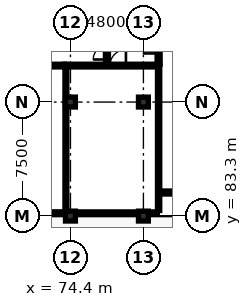
"""IFC4 building model, lengths in metres.
Left out: names, types, materials, properties, quantities, classifications, styles, units other than length and angle.
Written with IfcOpenShell. Run it as: python <this file> out.ifc"""

import sys

from ifc_helpers import new_model, si_unit, direction, frame, frame_2d, origin, origin_2d, place, context, subcontext, project, spatial, rectangle, extrude, element, fill, save


model = new_model("IFC4")
c1 = context("Model", 3, precision=1e-05, world=origin(), true_north=direction((0.0, 1.0)))
c2 = subcontext(c1, "Body", "Model", "MODEL_VIEW")
j1 = project(units=[si_unit("LENGTHUNIT", "METRE"), si_unit("PLANEANGLEUNIT", "RADIAN")], contexts=[c1])
p1 = place(None, origin())
s1 = spatial("IfcSite", under=j1, at=p1, CompositionType="ELEMENT")
p2 = place(p1, origin())
s2 = spatial("IfcBuilding", under=s1, at=p2, CompositionType="ELEMENT")
p3 = place(p2, origin())
s3 = spatial("IfcBuildingStorey", under=s2, at=p3, CompositionType="ELEMENT", Elevation=0.0)
for number, where, z_axis, x_axis in (
    (1, (74.4, 83.3, 0.0), (0.0, 0.0, 1.0), (1.0, 0.0, 0.0)),
    (2, (74.4, 90.8, 0.0), (0.0, 0.0, 1.0), (1.0, 0.0, 0.0)),
    (3, (79.2, 83.3, 0.0), (0.0, 0.0, 1.0), (1.0, 0.0, 0.0)),
    (4, (79.2, 90.8, 0.0), (0.0, 0.0, 1.0), (1.0, 0.0, 0.0)),
):
    element("IfcColumn", number, at=place(p3, frame(where, z_axis=z_axis, x_axis=x_axis)), inside=s3, PredefinedType="COLUMN", context=c2, shape_type="SweptSolid", body=[
        extrude(rectangle(XDim=0.65, YDim=0.65, at=origin_2d()), origin(), (0.0, 0.0, 1.0), 4.7),
    ])
p4 = place(p3, frame((76.8, 93.285, 0.0), z_axis=(0.0, 0.0, 1.0), x_axis=(0.0, 1.0, 0.0)))
e5 = element("IfcWall", 5, at=p4, inside=s3, PredefinedType="PARTITIONING", context=c2, shape_type="SweptSolid", body=[
    extrude(rectangle(XDim=2.43, YDim=0.2, at=frame_2d((1.215, 0.0))), origin(), (0.0, 0.0, 1.0), 4.7),
])
p5 = place(p4, frame((0.315, 0.0, 0.0)))
e6 = element("IfcOpeningElement", 6, at=p5, cuts=e5, PredefinedType="OPENING", context=c2, shape_type="SweptSolid", body=[
    extrude(rectangle(XDim=1.8, YDim=2.15, at=frame_2d((0.9, 1.075))), frame((0.0, 0.112, 0.0), z_axis=(0.0, -1.0, 0.0), x_axis=(1.0, 0.0, 0.0)), (0.0, 0.0, 1.0), 0.224),
])
p6 = place(p3, frame((68.085, 93.2, 0.0), z_axis=(0.0, 0.0, 1.0), x_axis=(1.0, 0.0, 0.0)))
e7 = element("IfcWall", 7, at=p6, inside=s3, PredefinedType="PARTITIONING", context=c2, shape_type="SweptSolid", body=[
    extrude(rectangle(XDim=5.93, YDim=0.18, at=frame_2d((2.965, 0.0))), origin(), (0.0, 0.0, 1.0), 3.985),
])
p7 = place(p6, frame((2.465, 0.0, 0.0)))
e8 = element("IfcOpeningElement", 8, at=p7, cuts=e7, PredefinedType="OPENING", context=c2, shape_type="SweptSolid", body=[
    extrude(rectangle(XDim=1.0, YDim=2.15, at=frame_2d((0.5, 1.075))), frame((0.0, 0.102, 0.0), z_axis=(0.0, -1.0, 0.0), x_axis=(1.0, 0.0, 0.0)), (0.0, 0.0, 1.0), 0.204),
])
p8 = place(p3, frame((74.027, 93.2, 0.0), z_axis=(0.0, 0.0, 1.0), x_axis=(1.0, 0.0, 0.0)))
e9 = element("IfcWall", 9, at=p8, inside=s3, PredefinedType="PARTITIONING", context=c2, shape_type="SweptSolid", body=[
    extrude(rectangle(XDim=6.088, YDim=0.18, at=frame_2d((3.044, 0.0))), origin(), (0.0, 0.0, 1.0), 3.985),
])
p9 = place(p8, frame((2.972, 0.0, 0.0)))
e10 = element("IfcOpeningElement", 10, at=p9, cuts=e9, PredefinedType="OPENING", context=c2, shape_type="SweptSolid", body=[
    extrude(rectangle(XDim=1.05, YDim=2.15, at=frame_2d((0.525, 1.075))), frame((0.0, 0.102, 0.0), z_axis=(0.0, -1.0, 0.0), x_axis=(1.0, 0.0, 0.0)), (0.0, 0.0, 1.0), 0.204),
])
p10 = place(p3, frame((80.2, 93.285, 0.0), z_axis=(0.0, 0.0, 1.0), x_axis=(0.0, 1.0, 0.0)))
e11 = element("IfcWall", 11, at=p10, inside=s3, PredefinedType="PARTITIONING", context=c2, shape_type="SweptSolid", body=[
    extrude(rectangle(XDim=2.43, YDim=0.2, at=frame_2d((1.215, 0.0))), origin(), (0.0, 0.0, 1.0), 4.7),
])
p11 = place(p10, frame((0.715, 0.0, 0.0)))
e12 = element("IfcOpeningElement", 12, at=p11, cuts=e11, PredefinedType="OPENING", context=c2, shape_type="SweptSolid", body=[
    extrude(rectangle(XDim=1.0, YDim=2.15, at=frame_2d((0.5, 1.075))), frame((0.0, 0.112, 0.0), z_axis=(0.0, -1.0, 0.0), x_axis=(1.0, 0.0, 0.0)), (0.0, 0.0, 1.0), 0.224),
])
p12 = place(p3, frame((80.285, 84.85, 0.0), z_axis=(0.0, 0.0, 1.0), x_axis=(1.0, 0.0, 0.0)))
e13 = element("IfcWall", 13, at=p12, inside=s3, PredefinedType="PARTITIONING", context=c2, shape_type="SweptSolid", body=[
    extrude(rectangle(XDim=4.98, YDim=0.2, at=frame_2d((2.49, 0.0))), origin(), (0.0, 0.0, 1.0), 3.985),
])
p13 = place(p12, frame((1.99, 0.0, 0.0)))
e14 = element("IfcOpeningElement", 14, at=p13, cuts=e13, PredefinedType="OPENING", context=c2, shape_type="SweptSolid", body=[
    extrude(rectangle(XDim=1.0, YDim=2.15, at=frame_2d((0.5, 1.075))), frame((0.0, 0.112, 0.0), z_axis=(0.0, -1.0, 0.0), x_axis=(1.0, 0.0, 0.0)), (0.0, 0.0, 1.0), 0.224),
])
p14 = place(p3, frame((68.085, 83.5, 0.0), z_axis=(0.0, 0.0, 1.0), x_axis=(1.0, 0.0, 0.0)))
e15 = element("IfcWall", 15, at=p14, inside=s3, PredefinedType="PARTITIONING", context=c2, shape_type="SweptSolid", body=[
    extrude(rectangle(XDim=5.978, YDim=0.16, at=frame_2d((2.989, 0.0))), origin(), (0.0, 0.0, 1.0), 3.985),
])
p15 = place(p3, frame((74.555, 83.5, 0.0), z_axis=(0.0, 0.0, 1.0), x_axis=(1.0, 0.0, 0.0)))
e16 = element("IfcWall", 16, at=p15, inside=s3, PredefinedType="PARTITIONING", context=c2, shape_type="SweptSolid", body=[
    extrude(rectangle(XDim=5.56, YDim=0.15, at=frame_2d((2.78, 0.0))), origin(), (0.0, 0.0, 1.0), 3.985),
])
p16 = place(p3, frame((74.1, 83.637, 0.0), z_axis=(0.0, 0.0, 1.0), x_axis=(0.0, 1.0, 0.0)))
e17 = element("IfcWall", 17, at=p16, inside=s3, PredefinedType="PARTITIONING", context=c2, shape_type="SweptSolid", body=[
    extrude(rectangle(XDim=9.461, YDim=0.125, at=frame_2d((4.73, 0.0))), origin(), (0.0, 0.0, 1.0), 3.985),
])
p17 = place(p3, frame((80.2, 83.665, 0.0), z_axis=(0.0, 0.0, 1.0), x_axis=(0.0, 1.0, 0.0)))
e18 = element("IfcWall", 18, at=p17, inside=s3, PredefinedType="PARTITIONING", context=c2, shape_type="SweptSolid", body=[
    extrude(rectangle(XDim=9.608, YDim=0.15, at=frame_2d((4.804, 0.0))), origin(), (0.0, 0.0, 1.0), 4.035),
])
p18 = place(p5, origin())
e19 = element("IfcDoor", 19, at=p18, inside=s3, OperationType="DOUBLE_DOOR_SINGLE_SWING", PredefinedType="DOOR", context=c2, shape_type="SweptSolid", body=[
    extrude(rectangle(XDim=1.8, YDim=2.15, at=frame_2d((0.9, 1.075))), frame((0.0, 0.025, 0.0), z_axis=(0.0, -1.0, 0.0), x_axis=(1.0, 0.0, 0.0)), (0.0, 0.0, 1.0), 0.05),
])
fill(e6, e19)
p19 = place(p9, origin())
e20 = element("IfcDoor", 20, at=p19, inside=s3, OperationType="SINGLE_SWING_RIGHT", PredefinedType="DOOR", context=c2, shape_type="SweptSolid", body=[
    extrude(rectangle(XDim=1.05, YDim=2.15, at=frame_2d((0.525, 1.075))), frame((0.0, 0.025, 0.0), z_axis=(0.0, -1.0, 0.0), x_axis=(1.0, 0.0, 0.0)), (0.0, 0.0, 1.0), 0.05),
])
fill(e10, e20)
p20 = place(p11, origin())
e21 = element("IfcDoor", 21, at=p20, inside=s3, OperationType="SINGLE_SWING_LEFT", PredefinedType="DOOR", context=c2, shape_type="SweptSolid", body=[
    extrude(rectangle(XDim=1.0, YDim=2.15, at=frame_2d((0.5, 1.075))), frame((0.0, 0.025, 0.0), z_axis=(0.0, -1.0, 0.0), x_axis=(1.0, 0.0, 0.0)), (0.0, 0.0, 1.0), 0.05),
])
fill(e12, e21)
save(model, sys.argv[1])
